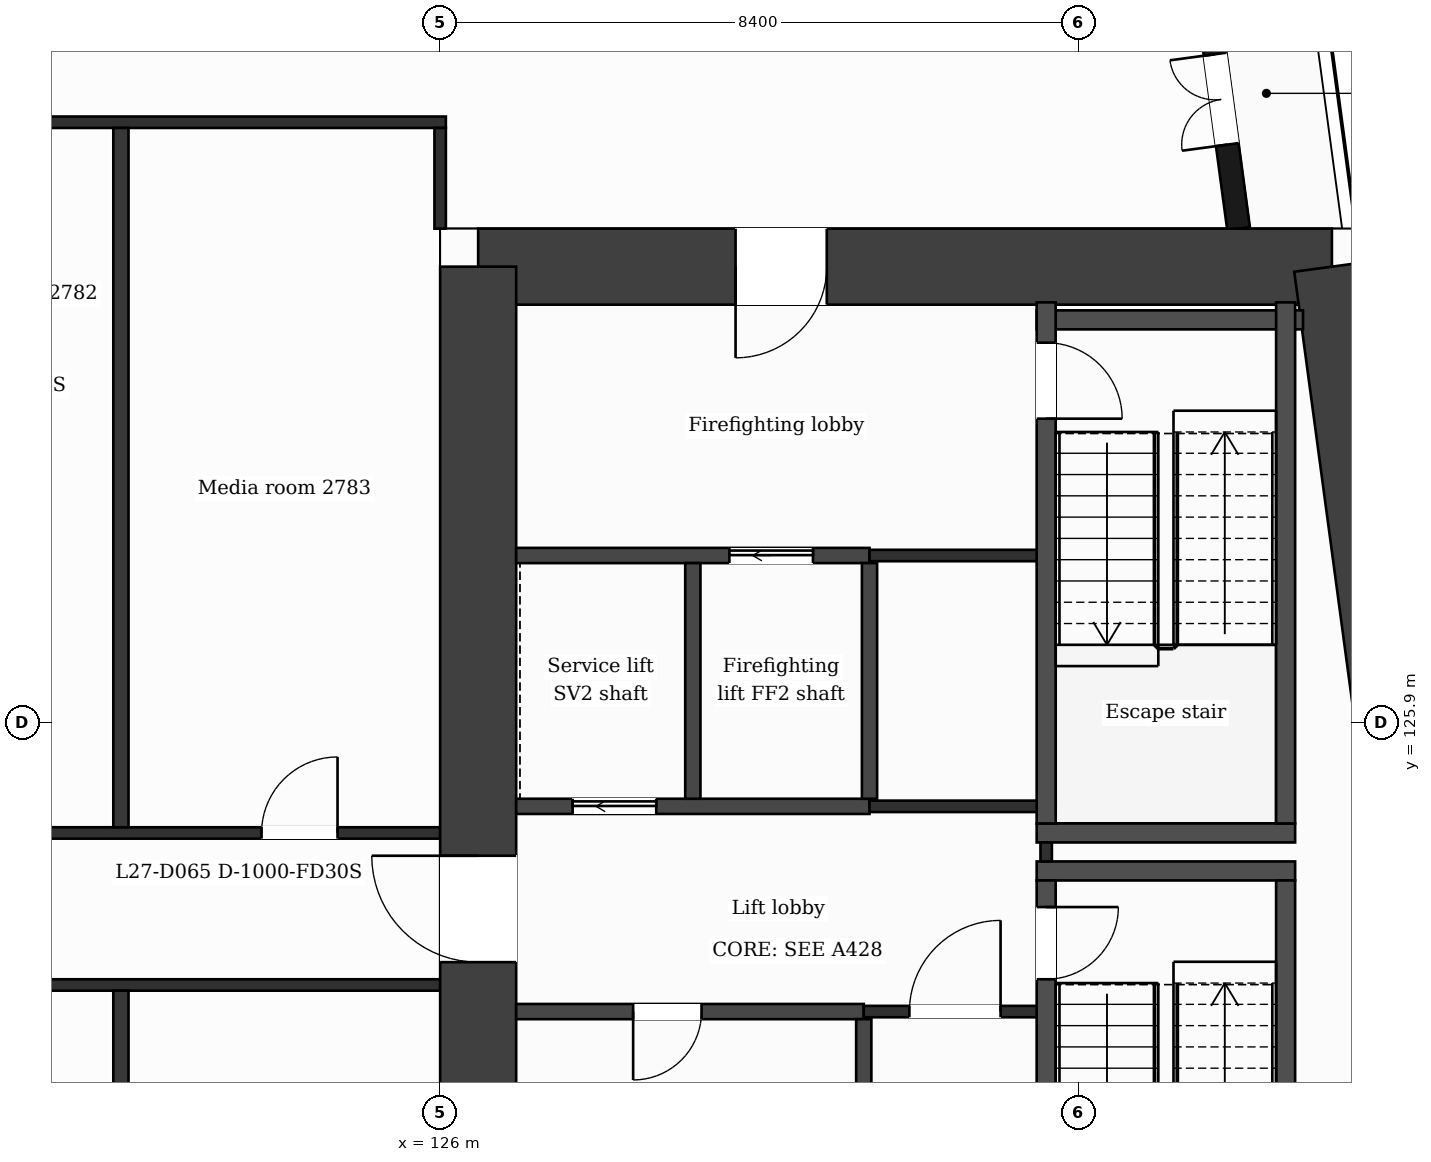
"""IFC4 building model, lengths in metres.
Left out: names, types, materials, properties, quantities, classifications, styles, units other than length and angle.
Written with IfcOpenShell. Run it as: python <this file> out.ifc"""

import sys

from ifc_helpers import new_model, si_unit, direction, frame, frame_2d, origin, place, context, subcontext, project, spatial, rectangle, extrude, element, fill, save


model = new_model("IFC4")
c1 = context("Model", 3, precision=1e-05, world=origin(), true_north=direction((0.0, 1.0)))
c2 = subcontext(c1, "Body", "Model", "MODEL_VIEW")
j1 = project(units=[si_unit("LENGTHUNIT", "METRE"), si_unit("PLANEANGLEUNIT", "RADIAN")], contexts=[c1])
p1 = place(None, origin())
s1 = spatial("IfcSite", under=j1, at=p1, CompositionType="ELEMENT")
p2 = place(p1, origin())
s2 = spatial("IfcBuilding", under=s1, at=p2, CompositionType="ELEMENT")
p3 = place(p2, frame((0.0, 0.0, 116.9)))
s3 = spatial("IfcBuildingStorey", under=s2, at=p3, CompositionType="ELEMENT", Elevation=116.9)
p4 = place(p3, frame((126.5, 131.9, 0.0), z_axis=(0.0, 0.0, 1.0), x_axis=(1.0, 0.0, 0.0)))
e1 = element("IfcWall", 1, at=p4, inside=s3, PredefinedType="SHEAR", context=c2, shape_type="SweptSolid", body=[
    extrude(rectangle(XDim=11.232, YDim=1.0, at=frame_2d((5.616, 0.0))), origin(), (0.0, 0.0, 1.0), 3.7),
])
p5 = place(p4, frame((3.386, 0.0, 0.0)))
e2 = element("IfcOpeningElement", 2, at=p5, cuts=e1, PredefinedType="OPENING", context=c2, shape_type="SweptSolid", body=[
    extrude(rectangle(XDim=1.2, YDim=2.1, at=frame_2d((0.6, 1.05))), frame((0.0, 0.51, 0.0), z_axis=(0.0, -1.0, 0.0), x_axis=(1.0, 0.0, 0.0)), (0.0, 0.0, 1.0), 1.02),
])
p6 = place(p3, frame((137.732, 131.9, 0.0), z_axis=(0.0, 0.0, 1.0), x_axis=(0.133411141623, -0.991060778808, 0.0)))
e3 = element("IfcWall", 3, at=p6, inside=s3, PredefinedType="SHEAR", context=c2, shape_type="SweptSolid", body=[
    extrude(rectangle(XDim=21.189, YDim=1.0, at=frame_2d((10.595, 0.0))), origin(), (0.0, 0.0, 1.0), 3.7),
])
p7 = place(p3, frame((126.5, 110.9, 0.0), z_axis=(0.0, 0.0, 1.0), x_axis=(0.0, 1.0, 0.0)))
e4 = element("IfcWall", 4, at=p7, inside=s3, PredefinedType="SHEAR", context=c2, shape_type="SweptSolid", body=[
    extrude(rectangle(XDim=21.0, YDim=1.0, at=frame_2d((10.5, 0.0))), origin(), (0.0, 0.0, 1.0), 3.7),
])
p8 = place(p7, frame((11.85, 0.0, 0.0)))
e5 = element("IfcOpeningElement", 5, at=p8, cuts=e4, PredefinedType="OPENING", context=c2, shape_type="SweptSolid", body=[
    extrude(rectangle(XDim=1.4, YDim=2.1, at=frame_2d((0.7, 1.05))), frame((0.0, 0.51, 0.0), z_axis=(0.0, -1.0, 0.0), x_axis=(1.0, 0.0, 0.0)), (0.0, 0.0, 1.0), 1.02),
])
p9 = place(p3, frame((136.504, 132.4, 0.0), z_axis=(0.0, 0.0, 1.0), x_axis=(-0.133399697462, 0.99106231929, 0.0)))
e6 = element("IfcWall", 6, at=p9, inside=s3, PredefinedType="SOLIDWALL", context=c2, shape_type="SweptSolid", body=[
    extrude(rectangle(XDim=6.74, YDim=0.3, at=frame_2d((3.37, 0.0))), origin(), (0.0, 0.0, 1.0), 3.38),
])
p10 = place(p9, frame((1.115, 0.0, 0.0)))
e7 = element("IfcOpeningElement", 7, at=p10, cuts=e6, PredefinedType="OPENING", context=c2, shape_type="SweptSolid", body=[
    extrude(rectangle(XDim=1.2, YDim=2.4, at=frame_2d((0.6, 1.2))), frame((0.0, 0.16, 0.0), z_axis=(0.0, -1.0, 0.0), x_axis=(1.0, 0.0, 0.0)), (0.0, 0.0, 1.0), 0.32),
])
p11 = place(p9, frame((3.835, 0.0, 0.9)))
e8 = element("IfcOpeningElement", 8, at=p11, cuts=e6, PredefinedType="OPENING", context=c2, shape_type="SweptSolid", body=[
    extrude(rectangle(XDim=2.4, YDim=2.1, at=frame_2d((1.2, 1.05))), frame((0.0, 0.16, 0.0), z_axis=(0.0, -1.0, 0.0), x_axis=(1.0, 0.0, 0.0)), (0.0, 0.0, 1.0), 0.32),
])
p12 = place(p3, frame((127.0, 122.1, 0.0), z_axis=(0.0, 0.0, 1.0), x_axis=(1.0, 0.0, 0.0)))
e9 = element("IfcWall", 9, at=p12, inside=s3, PredefinedType="PARTITIONING", context=c2, shape_type="SweptSolid", body=[
    extrude(rectangle(XDim=4.573, YDim=0.2, at=frame_2d((2.287, 0.0))), origin(), (0.0, 0.0, 1.0), 3.38),
])
p13 = place(p12, frame((1.539, 0.0, 0.0)))
e10 = element("IfcOpeningElement", 10, at=p13, cuts=e9, PredefinedType="OPENING", context=c2, shape_type="SweptSolid", body=[
    extrude(rectangle(XDim=0.9, YDim=2.1, at=frame_2d((0.45, 1.05))), frame((0.0, 0.11, 0.0), z_axis=(0.0, -1.0, 0.0), x_axis=(1.0, 0.0, 0.0)), (0.0, 0.0, 1.0), 0.22),
])
p14 = place(p3, frame((131.573, 122.1, 0.0), z_axis=(0.0, 0.0, 1.0), x_axis=(1.0, 0.0, 0.0)))
e11 = element("IfcWall", 11, at=p14, inside=s3, PredefinedType="PARTITIONING", context=c2, shape_type="SweptSolid", body=[
    extrude(rectangle(XDim=2.4, YDim=0.15, at=frame_2d((1.2, 0.0))), origin(), (0.0, 0.0, 1.0), 3.38),
])
p15 = place(p14, frame((0.6, 0.0, 0.0)))
e12 = element("IfcOpeningElement", 12, at=p15, cuts=e11, PredefinedType="OPENING", context=c2, shape_type="SweptSolid", body=[
    extrude(rectangle(XDim=1.2, YDim=2.1, at=frame_2d((0.6, 1.05))), frame((0.0, 0.085, 0.0), z_axis=(0.0, -1.0, 0.0), x_axis=(1.0, 0.0, 0.0)), (0.0, 0.0, 1.0), 0.17),
])
p16 = place(p3, frame((100.8, 122.45, 0.0), z_axis=(0.0, 0.0, 1.0), x_axis=(1.0, 0.0, 0.0)))
e13 = element("IfcWall", 13, at=p16, inside=s3, PredefinedType="PARTITIONING", context=c2, shape_type="SweptSolid", body=[
    extrude(rectangle(XDim=25.2, YDim=0.15, at=frame_2d((12.6, 0.0))), origin(), (0.0, 0.0, 1.0), 3.38),
])
for number, where, z_axis, x_axis in (
    (14, (133.848, 123.95, 0.0), (0.0, 0.0, 1.0), (1.0, 0.0, 0.0)),
    (15, (133.848, 124.45, 0.0), (0.0, 0.0, 1.0), (1.0, 0.0, 0.0)),
):
    element("IfcWall", number, at=place(p3, frame(where, z_axis=z_axis, x_axis=x_axis)), inside=s3, PredefinedType="PARTITIONING", context=c2, shape_type="SweptSolid", body=[
        extrude(rectangle(XDim=3.4, YDim=0.25, at=frame_2d((1.7, 0.0))), origin(), (0.0, 0.0, 1.0), 3.38),
    ])
p17 = place(p3, frame((100.8, 124.45, 0.0), z_axis=(0.0, 0.0, 1.0), x_axis=(1.0, 0.0, 0.0)))
e16 = element("IfcWall", 16, at=p17, inside=s3, PredefinedType="PARTITIONING", context=c2, shape_type="SweptSolid", body=[
    extrude(rectangle(XDim=25.2, YDim=0.15, at=frame_2d((12.6, 0.0))), origin(), (0.0, 0.0, 1.0), 3.38),
])
p18 = place(p17, frame((1.85, 0.0, 0.0)))
e17 = element("IfcOpeningElement", 17, at=p18, cuts=e16, PredefinedType="OPENING", context=c2, shape_type="SweptSolid", body=[
    extrude(rectangle(XDim=1.0, YDim=2.1, at=frame_2d((0.5, 1.05))), frame((0.0, 0.085, 0.0), z_axis=(0.0, -1.0, 0.0), x_axis=(1.0, 0.0, 0.0)), (0.0, 0.0, 1.0), 0.17),
])
p19 = place(p17, frame((6.425, 0.0, 0.0)))
e18 = element("IfcOpeningElement", 18, at=p19, cuts=e16, PredefinedType="OPENING", context=c2, shape_type="SweptSolid", body=[
    extrude(rectangle(XDim=1.0, YDim=2.1, at=frame_2d((0.5, 1.05))), frame((0.0, 0.085, 0.0), z_axis=(0.0, -1.0, 0.0), x_axis=(1.0, 0.0, 0.0)), (0.0, 0.0, 1.0), 0.17),
])
p20 = place(p17, frame((12.77, 0.0, 0.0)))
e19 = element("IfcOpeningElement", 19, at=p20, cuts=e16, PredefinedType="OPENING", context=c2, shape_type="SweptSolid", body=[
    extrude(rectangle(XDim=1.0, YDim=2.1, at=frame_2d((0.5, 1.05))), frame((0.0, 0.085, 0.0), z_axis=(0.0, -1.0, 0.0), x_axis=(1.0, 0.0, 0.0)), (0.0, 0.0, 1.0), 0.17),
])
p21 = place(p17, frame((17.8, 0.0, 0.0)))
e20 = element("IfcOpeningElement", 20, at=p21, cuts=e16, PredefinedType="OPENING", context=c2, shape_type="SweptSolid", body=[
    extrude(rectangle(XDim=1.0, YDim=2.1, at=frame_2d((0.5, 1.05))), frame((0.0, 0.085, 0.0), z_axis=(0.0, -1.0, 0.0), x_axis=(1.0, 0.0, 0.0)), (0.0, 0.0, 1.0), 0.17),
])
p22 = place(p17, frame((22.85, 0.0, 0.0)))
e21 = element("IfcOpeningElement", 21, at=p22, cuts=e16, PredefinedType="OPENING", context=c2, shape_type="SweptSolid", body=[
    extrude(rectangle(XDim=1.0, YDim=2.1, at=frame_2d((0.5, 1.05))), frame((0.0, 0.085, 0.0), z_axis=(0.0, -1.0, 0.0), x_axis=(1.0, 0.0, 0.0)), (0.0, 0.0, 1.0), 0.17),
])
p23 = place(p3, frame((127.0, 124.8, 0.0), z_axis=(0.0, 0.0, 1.0), x_axis=(1.0, 0.0, 0.0)))
e22 = element("IfcWall", 22, at=p23, inside=s3, PredefinedType="PARTITIONING", context=c2, shape_type="SweptSolid", body=[
    extrude(rectangle(XDim=4.649, YDim=0.2, at=frame_2d((2.324, 0.0))), origin(), (0.0, 0.0, 1.0), 3.38),
])
p24 = place(p23, frame((0.743, 0.0, 0.0)))
e23 = element("IfcOpeningElement", 23, at=p24, cuts=e22, PredefinedType="OPENING", context=c2, shape_type="SweptSolid", body=[
    extrude(rectangle(XDim=1.1, YDim=2.1, at=frame_2d((0.55, 1.05))), frame((0.0, 0.11, 0.0), z_axis=(0.0, -1.0, 0.0), x_axis=(1.0, 0.0, 0.0)), (0.0, 0.0, 1.0), 0.22),
])
p25 = place(p3, frame((131.649, 124.8, 0.0), z_axis=(0.0, 0.0, 1.0), x_axis=(1.0, 0.0, 0.0)))
e24 = element("IfcWall", 24, at=p25, inside=s3, PredefinedType="PARTITIONING", context=c2, shape_type="SweptSolid", body=[
    extrude(rectangle(XDim=2.449, YDim=0.15, at=frame_2d((1.225, 0.0))), origin(), (0.0, 0.0, 1.0), 3.38),
])
p26 = place(p3, frame((127.0, 128.1, 0.0), z_axis=(0.0, 0.0, 1.0), x_axis=(1.0, 0.0, 0.0)))
e25 = element("IfcWall", 25, at=p26, inside=s3, PredefinedType="PARTITIONING", context=c2, shape_type="SweptSolid", body=[
    extrude(rectangle(XDim=4.649, YDim=0.2, at=frame_2d((2.324, 0.0))), origin(), (0.0, 0.0, 1.0), 3.38),
])
p27 = place(p26, frame((2.805, 0.0, 0.0)))
e26 = element("IfcOpeningElement", 26, at=p27, cuts=e25, PredefinedType="OPENING", context=c2, shape_type="SweptSolid", body=[
    extrude(rectangle(XDim=1.1, YDim=2.1, at=frame_2d((0.55, 1.05))), frame((0.0, 0.11, 0.0), z_axis=(0.0, -1.0, 0.0), x_axis=(1.0, 0.0, 0.0)), (0.0, 0.0, 1.0), 0.22),
])
p28 = place(p3, frame((131.649, 128.1, 0.0), z_axis=(0.0, 0.0, 1.0), x_axis=(1.0, 0.0, 0.0)))
e27 = element("IfcWall", 27, at=p28, inside=s3, PredefinedType="PARTITIONING", context=c2, shape_type="SweptSolid", body=[
    extrude(rectangle(XDim=2.324, YDim=0.15, at=frame_2d((1.162, 0.0))), origin(), (0.0, 0.0, 1.0), 3.38),
])
p29 = place(p3, frame((133.848, 131.2, 0.0), z_axis=(0.0, 0.0, 1.0), x_axis=(1.0, 0.0, 0.0)))
e28 = element("IfcWall", 28, at=p29, inside=s3, PredefinedType="PARTITIONING", context=c2, shape_type="SweptSolid", body=[
    extrude(rectangle(XDim=3.504, YDim=0.25, at=frame_2d((1.752, 0.0))), origin(), (0.0, 0.0, 1.0), 3.38),
])
p30 = place(p3, frame((100.725, 133.8, 0.0), z_axis=(0.0, 0.0, 1.0), x_axis=(1.0, 0.0, 0.0)))
e29 = element("IfcWall", 29, at=p30, inside=s3, PredefinedType="PARTITIONING", context=c2, shape_type="SweptSolid", body=[
    extrude(rectangle(XDim=25.35, YDim=0.15, at=frame_2d((12.675, 0.0))), origin(), (0.0, 0.0, 1.0), 3.38),
])
p31 = place(p30, frame((18.225, 0.0, 0.0)))
e30 = element("IfcOpeningElement", 30, at=p31, cuts=e29, PredefinedType="OPENING", context=c2, shape_type="SweptSolid", body=[
    extrude(rectangle(XDim=1.0, YDim=2.1, at=frame_2d((0.5, 1.05))), frame((0.0, 0.085, 0.0), z_axis=(0.0, -1.0, 0.0), x_axis=(1.0, 0.0, 0.0)), (0.0, 0.0, 1.0), 0.17),
])
p32 = place(p3, frame((121.8, 109.075, 0.0), z_axis=(0.0, 0.0, 1.0), x_axis=(0.0, 1.0, 0.0)))
e31 = element("IfcWall", 31, at=p32, inside=s3, PredefinedType="PARTITIONING", context=c2, shape_type="SweptSolid", body=[
    extrude(rectangle(XDim=13.3, YDim=0.2, at=frame_2d((6.65, 0.0))), origin(), (0.0, 0.0, 1.0), 3.38),
])
p33 = place(p3, frame((121.8, 124.525, 0.0), z_axis=(0.0, 0.0, 1.0), x_axis=(0.0, 1.0, 0.0)))
e32 = element("IfcWall", 32, at=p33, inside=s3, PredefinedType="PARTITIONING", context=c2, shape_type="SweptSolid", body=[
    extrude(rectangle(XDim=9.2, YDim=0.2, at=frame_2d((4.6, 0.0))), origin(), (0.0, 0.0, 1.0), 3.38),
])
p34 = place(p3, frame((126.0, 132.4, 0.0), z_axis=(0.0, 0.0, 1.0), x_axis=(0.0, 1.0, 0.0)))
e33 = element("IfcWall", 33, at=p34, inside=s3, PredefinedType="PARTITIONING", context=c2, shape_type="SweptSolid", body=[
    extrude(rectangle(XDim=1.325, YDim=0.15, at=frame_2d((0.663, 0.0))), origin(), (0.0, 0.0, 1.0), 3.38),
])
p35 = place(p3, frame((129.324, 124.9, 0.0), z_axis=(0.0, 0.0, 1.0), x_axis=(0.0, 1.0, 0.0)))
e34 = element("IfcWall", 34, at=p35, inside=s3, PredefinedType="PARTITIONING", context=c2, shape_type="SweptSolid", body=[
    extrude(rectangle(XDim=3.1, YDim=0.2, at=frame_2d((1.55, 0.0))), origin(), (0.0, 0.0, 1.0), 3.38),
])
p36 = place(p3, frame((131.573, 116.97, 0.0), z_axis=(0.0, 0.0, 1.0), x_axis=(0.0, 1.0, 0.0)))
e35 = element("IfcWall", 35, at=p36, inside=s3, PredefinedType="PARTITIONING", context=c2, shape_type="SweptSolid", body=[
    extrude(rectangle(XDim=5.03, YDim=0.2, at=frame_2d((2.515, 0.0))), origin(), (0.0, 0.0, 1.0), 3.38),
])
p37 = place(p36, frame((0.58, 0.0, 0.0)))
e36 = element("IfcOpeningElement", 36, at=p37, cuts=e35, PredefinedType="OPENING", context=c2, shape_type="SweptSolid", body=[
    extrude(rectangle(XDim=0.9, YDim=2.1, at=frame_2d((0.45, 1.05))), frame((0.0, 0.11, 0.0), z_axis=(0.0, -1.0, 0.0), x_axis=(1.0, 0.0, 0.0)), (0.0, 0.0, 1.0), 0.22),
])
p38 = place(p3, frame((131.649, 124.9, 0.0), z_axis=(0.0, 0.0, 1.0), x_axis=(0.0, 1.0, 0.0)))
e37 = element("IfcWall", 37, at=p38, inside=s3, PredefinedType="PARTITIONING", context=c2, shape_type="SweptSolid", body=[
    extrude(rectangle(XDim=3.1, YDim=0.2, at=frame_2d((1.55, 0.0))), origin(), (0.0, 0.0, 1.0), 3.38),
])
p39 = place(p3, frame((133.973, 124.075, 0.0), z_axis=(0.0, 0.0, 1.0), x_axis=(0.0, 1.0, 0.0)))
e38 = element("IfcWall", 38, at=p39, inside=s3, PredefinedType="PARTITIONING", context=c2, shape_type="SweptSolid", body=[
    extrude(rectangle(XDim=0.25, YDim=0.15, at=frame_2d((0.125, 0.0))), origin(), (0.0, 0.0, 1.0), 3.38),
])
p40 = place(p3, frame((133.973, 116.97, 0.0), z_axis=(0.0, 0.0, 1.0), x_axis=(0.0, 1.0, 0.0)))
e39 = element("IfcWall", 39, at=p40, inside=s3, PredefinedType="PARTITIONING", context=c2, shape_type="SweptSolid", body=[
    extrude(rectangle(XDim=6.855, YDim=0.25, at=frame_2d((3.427, 0.0))), origin(), (0.0, 0.0, 1.0), 3.38),
])
p41 = place(p40, frame((5.555, 0.0, 0.0)))
e40 = element("IfcOpeningElement", 40, at=p41, cuts=e39, PredefinedType="OPENING", context=c2, shape_type="SweptSolid", body=[
    extrude(rectangle(XDim=0.95, YDim=2.1, at=frame_2d((0.475, 1.05))), frame((0.0, 0.135, 0.0), z_axis=(0.0, -1.0, 0.0), x_axis=(1.0, 0.0, 0.0)), (0.0, 0.0, 1.0), 0.27),
])
p42 = place(p3, frame((133.973, 124.575, 0.0), z_axis=(0.0, 0.0, 1.0), x_axis=(0.0, 1.0, 0.0)))
e41 = element("IfcWall", 41, at=p42, inside=s3, PredefinedType="PARTITIONING", context=c2, shape_type="SweptSolid", body=[
    extrude(rectangle(XDim=6.855, YDim=0.25, at=frame_2d((3.427, 0.0))), origin(), (0.0, 0.0, 1.0), 3.38),
])
p43 = place(p42, frame((5.325, 0.0, 0.0)))
e42 = element("IfcOpeningElement", 42, at=p43, cuts=e41, PredefinedType="OPENING", context=c2, shape_type="SweptSolid", body=[
    extrude(rectangle(XDim=1.0, YDim=2.1, at=frame_2d((0.5, 1.05))), frame((0.0, 0.135, 0.0), z_axis=(0.0, -1.0, 0.0), x_axis=(1.0, 0.0, 0.0)), (0.0, 0.0, 1.0), 0.27),
])
for number, where, z_axis, x_axis in (
    (43, (137.123, 116.97, 0.0), (0.0, 0.0, 1.0), (0.0, 1.0, 0.0)),
    (44, (137.123, 124.575, 0.0), (0.0, 0.0, 1.0), (0.0, 1.0, 0.0)),
):
    element("IfcWall", number, at=place(p3, frame(where, z_axis=z_axis, x_axis=x_axis)), inside=s3, PredefinedType="PARTITIONING", context=c2, shape_type="SweptSolid", body=[
        extrude(rectangle(XDim=6.855, YDim=0.25, at=frame_2d((3.427, 0.0))), origin(), (0.0, 0.0, 1.0), 3.38),
    ])
p44 = place(p10, origin())
e45 = element("IfcDoor", 45, at=p44, inside=s3, OperationType="DOUBLE_DOOR_SINGLE_SWING", PredefinedType="DOOR", context=c2, shape_type="SweptSolid", body=[
    extrude(rectangle(XDim=1.2, YDim=2.4, at=frame_2d((0.6, 1.2))), frame((0.0, 0.025, 0.0), z_axis=(0.0, -1.0, 0.0), x_axis=(1.0, 0.0, 0.0)), (0.0, 0.0, 1.0), 0.05),
])
fill(e7, e45)
p45 = place(p15, origin())
e46 = element("IfcDoor", 46, at=p45, inside=s3, OperationType="SINGLE_SWING_RIGHT", PredefinedType="DOOR", context=c2, shape_type="SweptSolid", body=[
    extrude(rectangle(XDim=1.2, YDim=2.1, at=frame_2d((0.6, 1.05))), frame((0.0, 0.025, 0.0), z_axis=(0.0, -1.0, 0.0), x_axis=(1.0, 0.0, 0.0)), (0.0, 0.0, 1.0), 0.05),
])
fill(e12, e46)
p46 = place(p27, origin())
e47 = element("IfcDoor", 47, at=p46, inside=s3, OperationType="SLIDING_TO_LEFT", PredefinedType="DOOR", context=c2, shape_type="SweptSolid", body=[
    extrude(rectangle(XDim=1.1, YDim=2.1, at=frame_2d((0.55, 1.05))), frame((0.0, 0.025, 0.0), z_axis=(0.0, -1.0, 0.0), x_axis=(1.0, 0.0, 0.0)), (0.0, 0.0, 1.0), 0.05),
])
fill(e26, e47)
p47 = place(p24, origin())
e48 = element("IfcDoor", 48, at=p47, inside=s3, OperationType="SLIDING_TO_LEFT", PredefinedType="DOOR", context=c2, shape_type="SweptSolid", body=[
    extrude(rectangle(XDim=1.1, YDim=2.1, at=frame_2d((0.55, 1.05))), frame((0.0, 0.025, 0.0), z_axis=(0.0, -1.0, 0.0), x_axis=(1.0, 0.0, 0.0)), (0.0, 0.0, 1.0), 0.05),
])
fill(e23, e48)
p48 = place(p13, origin())
e49 = element("IfcDoor", 49, at=p48, inside=s3, OperationType="SINGLE_SWING_LEFT", PredefinedType="DOOR", context=c2, shape_type="SweptSolid", body=[
    extrude(rectangle(XDim=0.9, YDim=2.1, at=frame_2d((0.45, 1.05))), frame((0.0, 0.025, 0.0), z_axis=(0.0, -1.0, 0.0), x_axis=(1.0, 0.0, 0.0)), (0.0, 0.0, 1.0), 0.05),
])
fill(e10, e49)
p49 = place(p41, origin())
e50 = element("IfcDoor", 50, at=p49, inside=s3, OperationType="SINGLE_SWING_RIGHT", PredefinedType="DOOR", context=c2, shape_type="SweptSolid", body=[
    extrude(rectangle(XDim=0.95, YDim=2.1, at=frame_2d((0.475, 1.05))), frame((0.0, 0.025, 0.0), z_axis=(0.0, -1.0, 0.0), x_axis=(1.0, 0.0, 0.0)), (0.0, 0.0, 1.0), 0.05),
])
fill(e40, e50)
p50 = place(p43, origin())
e51 = element("IfcDoor", 51, at=p50, inside=s3, OperationType="SINGLE_SWING_LEFT", PredefinedType="DOOR", context=c2, shape_type="SweptSolid", body=[
    extrude(rectangle(XDim=1.0, YDim=2.1, at=frame_2d((0.5, 1.05))), frame((0.0, 0.025, 0.0), z_axis=(0.0, -1.0, 0.0), x_axis=(1.0, 0.0, 0.0)), (0.0, 0.0, 1.0), 0.05),
])
fill(e42, e51)
p51 = place(p22, origin())
e52 = element("IfcDoor", 52, at=p51, inside=s3, OperationType="SINGLE_SWING_RIGHT", PredefinedType="DOOR", context=c2, shape_type="SweptSolid", body=[
    extrude(rectangle(XDim=1.0, YDim=2.1, at=frame_2d((0.5, 1.05))), frame((0.0, 0.025, 0.0), z_axis=(0.0, -1.0, 0.0), x_axis=(1.0, 0.0, 0.0)), (0.0, 0.0, 1.0), 0.05),
])
fill(e21, e52)
p52 = place(p5, origin())
e53 = element("IfcDoor", 53, at=p52, inside=s3, OperationType="SINGLE_SWING_LEFT", PredefinedType="DOOR", context=c2, shape_type="SweptSolid", body=[
    extrude(rectangle(XDim=1.2, YDim=2.1, at=frame_2d((0.6, 1.05))), frame((0.0, 0.025, 0.0), z_axis=(0.0, -1.0, 0.0), x_axis=(1.0, 0.0, 0.0)), (0.0, 0.0, 1.0), 0.05),
])
fill(e2, e53)
p53 = place(p8, origin())
e54 = element("IfcDoor", 54, at=p53, inside=s3, OperationType="SINGLE_SWING_RIGHT", PredefinedType="DOOR", context=c2, shape_type="SweptSolid", body=[
    extrude(rectangle(XDim=1.4, YDim=2.1, at=frame_2d((0.7, 1.05))), frame((0.0, 0.025, 0.0), z_axis=(0.0, -1.0, 0.0), x_axis=(1.0, 0.0, 0.0)), (0.0, 0.0, 1.0), 0.05),
])
fill(e5, e54)
save(model, sys.argv[1])
